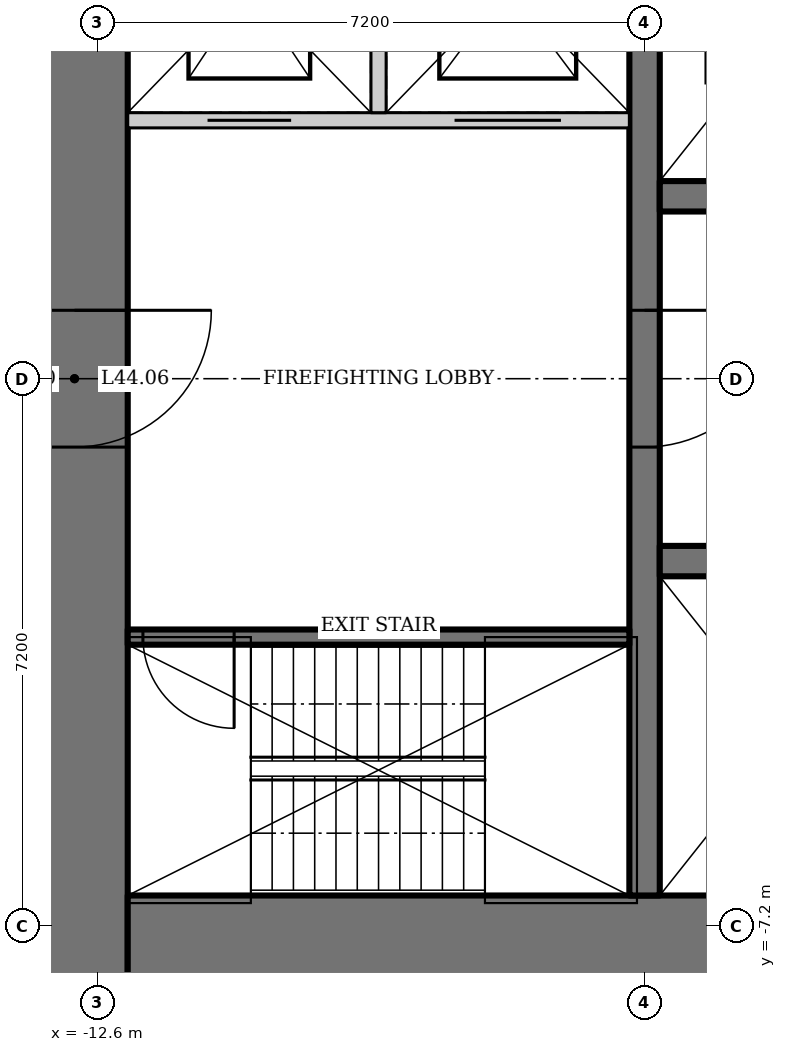
"""IFC4 building model, lengths in metres.
Left out: names, types, materials, properties, quantities, classifications, styles, units other than length and angle.
Written with IfcOpenShell. Run it as: python <this file> out.ifc"""

import sys

from ifc_helpers import new_model, si_unit, direction, frame, frame_2d, origin, place, context, subcontext, project, spatial, rectangle, extrude, element, fill, save


model = new_model("IFC4")
c1 = context("Model", 3, precision=1e-05, world=origin(), true_north=direction((0.0, 1.0)))
c2 = subcontext(c1, "Body", "Model", "MODEL_VIEW")
j1 = project(units=[si_unit("LENGTHUNIT", "METRE"), si_unit("PLANEANGLEUNIT", "RADIAN")], contexts=[c1])
p1 = place(None, origin())
s1 = spatial("IfcSite", under=j1, at=p1, CompositionType="ELEMENT")
p2 = place(p1, origin())
s2 = spatial("IfcBuilding", under=s1, at=p2, CompositionType="ELEMENT")
p3 = place(p2, frame((0.0, 0.0, 188.8)))
s3 = spatial("IfcBuildingStorey", under=s2, at=p3, CompositionType="ELEMENT", Elevation=188.8)
p4 = place(p3, frame((-12.9, 13.0, 0.0), z_axis=(0.0, 0.0, 1.0), x_axis=(0.0, -1.0, 0.0)))
e1 = element("IfcWall", 1, at=p4, inside=s3, PredefinedType="SHEAR", context=c2, shape_type="SweptSolid", body=[
    extrude(rectangle(XDim=26.0, YDim=1.4, at=frame_2d((13.0, 0.0))), origin(), (0.0, 0.0, 1.0), 4.2),
])
p5 = place(p4, frame((12.1, 0.0, 0.0)))
e2 = element("IfcOpeningElement", 2, at=p5, cuts=e1, PredefinedType="OPENING", context=c2, shape_type="SweptSolid", body=[
    extrude(rectangle(XDim=1.8, YDim=2.1, at=frame_2d((0.9, 1.05))), frame((0.0, 0.71, 0.0), z_axis=(0.0, -1.0, 0.0), x_axis=(1.0, 0.0, 0.0)), (0.0, 0.0, 1.0), 1.42),
])
p6 = place(p3, frame((-12.2, -7.6, 0.0), z_axis=(0.0, 0.0, 1.0), x_axis=(1.0, 0.0, 0.0)))
e3 = element("IfcWall", 3, at=p6, inside=s3, PredefinedType="SHEAR", context=c2, shape_type="SweptSolid", body=[
    extrude(rectangle(XDim=24.4, YDim=1.6, at=frame_2d((12.2, 0.0))), origin(), (0.0, 0.0, 1.0), 4.2),
])
p7 = place(p3, frame((-5.4, 6.8, 0.0), z_axis=(0.0, 0.0, 1.0), x_axis=(0.0, -1.0, 0.0)))
e4 = element("IfcWall", 4, at=p7, inside=s3, PredefinedType="SHEAR", context=c2, shape_type="SweptSolid", body=[
    extrude(rectangle(XDim=13.6, YDim=0.4, at=frame_2d((6.8, 0.0))), origin(), (0.0, 0.0, 1.0), 4.2),
])
p8 = place(p7, frame((5.9, 0.0, 0.0)))
e5 = element("IfcOpeningElement", 5, at=p8, cuts=e4, PredefinedType="OPENING", context=c2, shape_type="SweptSolid", body=[
    extrude(rectangle(XDim=1.8, YDim=2.1, at=frame_2d((0.9, 1.05))), frame((0.0, 0.21, 0.0), z_axis=(0.0, -1.0, 0.0), x_axis=(1.0, 0.0, 0.0)), (0.0, 0.0, 1.0), 0.42),
])
p9 = place(p3, frame((-5.2, -2.4, 0.0), z_axis=(0.0, 0.0, 1.0), x_axis=(1.0, 0.0, 0.0)))
e6 = element("IfcWall", 6, at=p9, inside=s3, PredefinedType="SHEAR", context=c2, shape_type="SweptSolid", body=[
    extrude(rectangle(XDim=10.4, YDim=0.4, at=frame_2d((5.2, 0.0))), origin(), (0.0, 0.0, 1.0), 4.2),
])
p10 = place(p3, frame((5.2, 2.4, 0.0), z_axis=(0.0, 0.0, 1.0), x_axis=(-1.0, 0.0, 0.0)))
e7 = element("IfcWall", 7, at=p10, inside=s3, PredefinedType="SHEAR", context=c2, shape_type="SweptSolid", body=[
    extrude(rectangle(XDim=10.4, YDim=0.4, at=frame_2d((5.2, 0.0))), origin(), (0.0, 0.0, 1.0), 4.2),
])
p11 = place(p10, frame((8.183, 0.0, 0.0)))
e8 = element("IfcOpeningElement", 8, at=p11, cuts=e7, PredefinedType="OPENING", context=c2, shape_type="SweptSolid", body=[
    extrude(rectangle(XDim=1.1, YDim=2.2, at=frame_2d((0.55, 1.1))), frame((0.0, 0.21, 0.0), z_axis=(0.0, -1.0, 0.0), x_axis=(1.0, 0.0, 0.0)), (0.0, 0.0, 1.0), 0.42),
])
p12 = place(p10, frame((4.65, 0.0, 0.0)))
e9 = element("IfcOpeningElement", 9, at=p12, cuts=e7, PredefinedType="OPENING", context=c2, shape_type="SweptSolid", body=[
    extrude(rectangle(XDim=1.1, YDim=2.2, at=frame_2d((0.55, 1.1))), frame((0.0, 0.21, 0.0), z_axis=(0.0, -1.0, 0.0), x_axis=(1.0, 0.0, 0.0)), (0.0, 0.0, 1.0), 0.42),
])
p13 = place(p10, frame((1.117, 0.0, 0.0)))
e10 = element("IfcOpeningElement", 10, at=p13, cuts=e7, PredefinedType="OPENING", context=c2, shape_type="SweptSolid", body=[
    extrude(rectangle(XDim=1.1, YDim=2.2, at=frame_2d((0.55, 1.1))), frame((0.0, 0.21, 0.0), z_axis=(0.0, -1.0, 0.0), x_axis=(1.0, 0.0, 0.0)), (0.0, 0.0, 1.0), 0.42),
])
p14 = place(p3, frame((-5.6, -3.4, 0.0), z_axis=(0.0, 0.0, 1.0), x_axis=(-1.0, 0.0, 0.0)))
e11 = element("IfcWall", 11, at=p14, inside=s3, PredefinedType="SHEAR", context=c2, shape_type="SweptSolid", body=[
    extrude(rectangle(XDim=6.6, YDim=0.2, at=frame_2d((3.3, 0.0))), origin(), (0.0, 0.0, 1.0), 4.2),
])
p15 = place(p14, frame((5.2, 0.0, 0.0)))
e12 = element("IfcOpeningElement", 12, at=p15, cuts=e11, PredefinedType="OPENING", context=c2, shape_type="SweptSolid", body=[
    extrude(rectangle(XDim=1.2, YDim=2.1, at=frame_2d((0.6, 1.05))), frame((0.0, 0.11, 0.0), z_axis=(0.0, -1.0, 0.0), x_axis=(1.0, 0.0, 0.0)), (0.0, 0.0, 1.0), 0.22),
])
p16 = place(p3, frame((-12.2, 3.4, 0.0), z_axis=(0.0, 0.0, 1.0), x_axis=(1.0, 0.0, 0.0)))
e13 = element("IfcWall", 13, at=p16, inside=s3, PredefinedType="SOLIDWALL", context=c2, shape_type="SweptSolid", body=[
    extrude(rectangle(XDim=6.6, YDim=0.2, at=frame_2d((3.3, 0.0))), origin(), (0.0, 0.0, 1.0), 4.2),
])
p17 = place(p16, frame((1.05, 0.0, 0.0)))
e14 = element("IfcOpeningElement", 14, at=p17, cuts=e13, PredefinedType="OPENING", context=c2, shape_type="SweptSolid", body=[
    extrude(rectangle(XDim=1.1, YDim=2.2, at=frame_2d((0.55, 1.1))), frame((0.0, 0.11, 0.0), z_axis=(0.0, -1.0, 0.0), x_axis=(1.0, 0.0, 0.0)), (0.0, 0.0, 1.0), 0.22),
])
p18 = place(p16, frame((4.3, 0.0, 0.0)))
e15 = element("IfcOpeningElement", 15, at=p18, cuts=e13, PredefinedType="OPENING", context=c2, shape_type="SweptSolid", body=[
    extrude(rectangle(XDim=1.4, YDim=2.2, at=frame_2d((0.7, 1.1))), frame((0.0, 0.11, 0.0), z_axis=(0.0, -1.0, 0.0), x_axis=(1.0, 0.0, 0.0)), (0.0, 0.0, 1.0), 0.22),
])
p19 = place(p3, frame((-8.9, 3.5, 0.0), z_axis=(0.0, 0.0, 1.0), x_axis=(0.0, 1.0, 0.0)))
e16 = element("IfcWall", 16, at=p19, inside=s3, PredefinedType="SOLIDWALL", context=c2, shape_type="SweptSolid", body=[
    extrude(rectangle(XDim=3.3, YDim=0.2, at=frame_2d((1.65, 0.0))), origin(), (0.0, 0.0, 1.0), 4.2),
])
p20 = place(p8, origin())
e17 = element("IfcDoor", 17, at=p20, inside=s3, OperationType="DOUBLE_DOOR_DOUBLE_SWING", PredefinedType="DOOR", context=c2, shape_type="SweptSolid", body=[
    extrude(rectangle(XDim=1.8, YDim=2.1, at=frame_2d((0.9, 1.05))), frame((0.0, 0.025, 0.0), z_axis=(0.0, -1.0, 0.0), x_axis=(1.0, 0.0, 0.0)), (0.0, 0.0, 1.0), 0.05),
])
fill(e5, e17)
p21 = place(p15, origin())
e18 = element("IfcDoor", 18, at=p21, inside=s3, OperationType="SINGLE_SWING_RIGHT", PredefinedType="DOOR", context=c2, shape_type="SweptSolid", body=[
    extrude(rectangle(XDim=1.2, YDim=2.1, at=frame_2d((0.6, 1.05))), frame((0.0, 0.025, 0.0), z_axis=(0.0, -1.0, 0.0), x_axis=(1.0, 0.0, 0.0)), (0.0, 0.0, 1.0), 0.05),
])
fill(e12, e18)
p22 = place(p5, origin())
e19 = element("IfcDoor", 19, at=p22, inside=s3, OperationType="DOUBLE_DOOR_DOUBLE_SWING", PredefinedType="DOOR", context=c2, shape_type="SweptSolid", body=[
    extrude(rectangle(XDim=1.8, YDim=2.1, at=frame_2d((0.9, 1.05))), frame((0.0, 0.025, 0.0), z_axis=(0.0, -1.0, 0.0), x_axis=(1.0, 0.0, 0.0)), (0.0, 0.0, 1.0), 0.05),
])
fill(e2, e19)
p23 = place(p17, origin())
e20 = element("IfcDoor", 20, at=p23, inside=s3, OperationType="DOUBLE_DOOR_SLIDING", PredefinedType="DOOR", context=c2, shape_type="SweptSolid", body=[
    extrude(rectangle(XDim=1.1, YDim=2.2, at=frame_2d((0.55, 1.1))), frame((0.0, 0.025, 0.0), z_axis=(0.0, -1.0, 0.0), x_axis=(1.0, 0.0, 0.0)), (0.0, 0.0, 1.0), 0.05),
])
fill(e14, e20)
p24 = place(p18, origin())
e21 = element("IfcDoor", 21, at=p24, inside=s3, OperationType="DOUBLE_DOOR_SLIDING", PredefinedType="DOOR", context=c2, shape_type="SweptSolid", body=[
    extrude(rectangle(XDim=1.4, YDim=2.2, at=frame_2d((0.7, 1.1))), frame((0.0, 0.025, 0.0), z_axis=(0.0, -1.0, 0.0), x_axis=(1.0, 0.0, 0.0)), (0.0, 0.0, 1.0), 0.05),
])
fill(e15, e21)
save(model, sys.argv[1])
